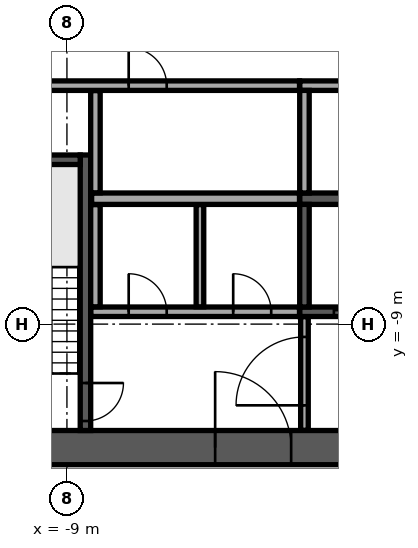
"""IFC4 building model, lengths in metres.
Left out: names, types, materials, properties, quantities, classifications, styles, units other than length and angle.
Written with IfcOpenShell. Run it as: python <this file> out.ifc"""

import sys

from ifc_helpers import new_model, si_unit, direction, frame, frame_2d, origin, place, context, subcontext, project, spatial, rectangle, extrude, element, fill, save


model = new_model("IFC4")
c1 = context("Model", 3, precision=1e-05, world=origin(), true_north=direction((0.0, 1.0)))
c2 = subcontext(c1, "Body", "Model", "MODEL_VIEW")
j1 = project(units=[si_unit("LENGTHUNIT", "METRE"), si_unit("PLANEANGLEUNIT", "RADIAN")], contexts=[c1])
p1 = place(None, origin())
s1 = spatial("IfcSite", under=j1, at=p1, CompositionType="ELEMENT")
p2 = place(p1, origin())
s2 = spatial("IfcBuilding", under=s1, at=p2, CompositionType="ELEMENT")
p3 = place(p2, frame((0.0, 0.0, 205.3)))
s3 = spatial("IfcBuildingStorey", under=s2, at=p3, CompositionType="ELEMENT", Elevation=205.3)
p4 = place(p3, frame((-12.7, -12.25, 0.0), z_axis=(0.0, 0.0, 1.0), x_axis=(1.0, 0.0, 0.0)))
e1 = element("IfcWall", 1, at=p4, inside=s3, PredefinedType="SHEAR", context=c2, shape_type="SweptSolid", body=[
    extrude(rectangle(XDim=25.4, YDim=0.9, at=frame_2d((12.7, 0.0))), origin(), (0.0, 0.0, 1.0), 3.62),
])
p5 = place(p4, frame((7.6, 0.0, 0.0)))
e2 = element("IfcOpeningElement", 2, at=p5, cuts=e1, PredefinedType="OPENING", context=c2, shape_type="SweptSolid", body=[
    extrude(rectangle(XDim=2.0, YDim=2.1, at=frame_2d((1.0, 1.05))), frame((0.0, 0.46, 0.0), z_axis=(0.0, -1.0, 0.0), x_axis=(1.0, 0.0, 0.0)), (0.0, 0.0, 1.0), 0.92),
])
p6 = place(p4, frame((17.725, 0.0, 0.0)))
e3 = element("IfcOpeningElement", 3, at=p6, cuts=e1, PredefinedType="OPENING", context=c2, shape_type="SweptSolid", body=[
    extrude(rectangle(XDim=1.2, YDim=2.1, at=frame_2d((0.6, 1.05))), frame((0.0, 0.46, 0.0), z_axis=(0.0, -1.0, 0.0), x_axis=(1.0, 0.0, 0.0)), (0.0, 0.0, 1.0), 0.92),
])
p7 = place(p4, frame((1.875, 0.0, 0.0)))
e4 = element("IfcOpeningElement", 4, at=p7, cuts=e1, PredefinedType="OPENING", context=c2, shape_type="SweptSolid", body=[
    extrude(rectangle(XDim=1.2, YDim=2.1, at=frame_2d((0.6, 1.05))), frame((0.0, 0.46, 0.0), z_axis=(0.0, -1.0, 0.0), x_axis=(1.0, 0.0, 0.0)), (0.0, 0.0, 1.0), 0.92),
])
p8 = place(p4, frame((22.325, 0.0, 0.0)))
e5 = element("IfcOpeningElement", 5, at=p8, cuts=e1, PredefinedType="OPENING", context=c2, shape_type="SweptSolid", body=[
    extrude(rectangle(XDim=1.2, YDim=2.1, at=frame_2d((0.6, 1.05))), frame((0.0, 0.46, 0.0), z_axis=(0.0, -1.0, 0.0), x_axis=(1.0, 0.0, 0.0)), (0.0, 0.0, 1.0), 0.92),
])
p9 = place(p3, frame((-2.875, -5.7, 0.0), z_axis=(0.0, 0.0, 1.0), x_axis=(1.0, 0.0, 0.0)))
e6 = element("IfcWall", 6, at=p9, inside=s3, PredefinedType="SOLIDWALL", context=c2, shape_type="SweptSolid", body=[
    extrude(rectangle(XDim=11.25, YDim=0.3, at=frame_2d((5.625, 0.0))), origin(), (0.0, 0.0, 1.0), 3.62),
])
p10 = place(p3, frame((-2.875, -2.725, 0.0), z_axis=(0.0, 0.0, 1.0), x_axis=(1.0, 0.0, 0.0)))
e7 = element("IfcWall", 7, at=p10, inside=s3, PredefinedType="SOLIDWALL", context=c2, shape_type="SweptSolid", body=[
    extrude(rectangle(XDim=8.5, YDim=0.25, at=frame_2d((4.25, 0.0))), origin(), (0.0, 0.0, 1.0), 3.62),
])
p11 = place(p3, frame((-2.75, -5.55, 0.0), z_axis=(0.0, 0.0, 1.0), x_axis=(0.0, 1.0, 0.0)))
e8 = element("IfcWall", 8, at=p11, inside=s3, PredefinedType="SOLIDWALL", context=c2, shape_type="SweptSolid", body=[
    extrude(rectangle(XDim=2.7, YDim=0.25, at=frame_2d((1.35, 0.0))), origin(), (0.0, 0.0, 1.0), 3.62),
])
p12 = place(p3, frame((-2.875, -8.675, 0.0), z_axis=(0.0, 0.0, 1.0), x_axis=(1.0, 0.0, 0.0)))
e9 = element("IfcWall", 9, at=p12, inside=s3, PredefinedType="SOLIDWALL", context=c2, shape_type="SweptSolid", body=[
    extrude(rectangle(XDim=11.25, YDim=0.25, at=frame_2d((5.625, 0.0))), origin(), (0.0, 0.0, 1.0), 3.62),
])
p13 = place(p12, frame((0.9, 0.0, 0.0)))
e10 = element("IfcOpeningElement", 10, at=p13, cuts=e9, PredefinedType="OPENING", context=c2, shape_type="SweptSolid", body=[
    extrude(rectangle(XDim=1.2, YDim=2.1, at=frame_2d((0.6, 1.05))), frame((0.0, 0.135, 0.0), z_axis=(0.0, -1.0, 0.0), x_axis=(1.0, 0.0, 0.0)), (0.0, 0.0, 1.0), 0.27),
])
p14 = place(p12, frame((3.65, 0.0, 0.0)))
e11 = element("IfcOpeningElement", 11, at=p14, cuts=e9, PredefinedType="OPENING", context=c2, shape_type="SweptSolid", body=[
    extrude(rectangle(XDim=1.2, YDim=2.1, at=frame_2d((0.6, 1.05))), frame((0.0, 0.135, 0.0), z_axis=(0.0, -1.0, 0.0), x_axis=(1.0, 0.0, 0.0)), (0.0, 0.0, 1.0), 0.27),
])
p15 = place(p12, frame((6.4, 0.0, 0.0)))
e12 = element("IfcOpeningElement", 12, at=p15, cuts=e9, PredefinedType="OPENING", context=c2, shape_type="SweptSolid", body=[
    extrude(rectangle(XDim=1.2, YDim=2.1, at=frame_2d((0.6, 1.05))), frame((0.0, 0.135, 0.0), z_axis=(0.0, -1.0, 0.0), x_axis=(1.0, 0.0, 0.0)), (0.0, 0.0, 1.0), 0.27),
])
p16 = place(p12, frame((9.15, 0.0, 0.0)))
e13 = element("IfcOpeningElement", 13, at=p16, cuts=e9, PredefinedType="OPENING", context=c2, shape_type="SweptSolid", body=[
    extrude(rectangle(XDim=1.2, YDim=2.1, at=frame_2d((0.6, 1.05))), frame((0.0, 0.135, 0.0), z_axis=(0.0, -1.0, 0.0), x_axis=(1.0, 0.0, 0.0)), (0.0, 0.0, 1.0), 0.27),
])
p17 = place(p3, frame((-2.75, -8.55, 0.0), z_axis=(0.0, 0.0, 1.0), x_axis=(0.0, 1.0, 0.0)))
e14 = element("IfcWall", 14, at=p17, inside=s3, PredefinedType="SOLIDWALL", context=c2, shape_type="SweptSolid", body=[
    extrude(rectangle(XDim=2.7, YDim=0.25, at=frame_2d((1.35, 0.0))), origin(), (0.0, 0.0, 1.0), 3.62),
])
p18 = place(p3, frame((-8.512, -4.55, 0.0), z_axis=(0.0, 0.0, 1.0), x_axis=(0.0, -1.0, 0.0)))
e15 = element("IfcWall", 15, at=p18, inside=s3, PredefinedType="SOLIDWALL", context=c2, shape_type="SweptSolid", body=[
    extrude(rectangle(XDim=7.25, YDim=0.275, at=frame_2d((3.625, 0.0))), origin(), (0.0, 0.0, 1.0), 3.62),
])
p19 = place(p18, frame((6.0, 0.0, 0.0)))
e16 = element("IfcOpeningElement", 16, at=p19, cuts=e15, PredefinedType="OPENING", context=c2, shape_type="SweptSolid", body=[
    extrude(rectangle(XDim=1.0, YDim=2.1, at=frame_2d((0.5, 1.05))), frame((0.0, 0.147, 0.0), z_axis=(0.0, -1.0, 0.0), x_axis=(1.0, 0.0, 0.0)), (0.0, 0.0, 1.0), 0.295),
])
p20 = place(p3, frame((-8.65, -4.675, 0.0), z_axis=(0.0, 0.0, 1.0), x_axis=(-1.0, 0.0, 0.0)))
e17 = element("IfcWall", 17, at=p20, inside=s3, PredefinedType="SOLIDWALL", context=c2, shape_type="SweptSolid", body=[
    extrude(rectangle(XDim=3.15, YDim=0.25, at=frame_2d((1.575, 0.0))), origin(), (0.0, 0.0, 1.0), 3.62),
])
p21 = place(p3, frame((-2.75, -11.795, 0.0), z_axis=(0.0, 0.0, 1.0), x_axis=(0.0, 1.0, 0.0)))
e18 = element("IfcWall", 18, at=p21, inside=s3, PredefinedType="PARTITIONING", context=c2, shape_type="SweptSolid", body=[
    extrude(rectangle(XDim=2.99, YDim=0.2, at=frame_2d((1.495, 0.0))), origin(), (0.0, 0.0, 1.0), 3.62),
])
p22 = place(p21, frame((0.657, 0.0, 0.0)))
e19 = element("IfcOpeningElement", 19, at=p22, cuts=e18, PredefinedType="OPENING", context=c2, shape_type="SweptSolid", body=[
    extrude(rectangle(XDim=1.8, YDim=2.1, at=frame_2d((0.9, 1.05))), frame((0.0, 0.11, 0.0), z_axis=(0.0, -1.0, 0.0), x_axis=(1.0, 0.0, 0.0)), (0.0, 0.0, 1.0), 0.22),
])
p23 = place(p3, frame((-8.37, -8.675, 0.0), z_axis=(0.0, 0.0, 1.0), x_axis=(1.0, 0.0, 0.0)))
e20 = element("IfcWall", 20, at=p23, inside=s3, PredefinedType="PARTITIONING", context=c2, shape_type="SweptSolid", body=[
    extrude(rectangle(XDim=5.49, YDim=0.25, at=frame_2d((2.745, 0.0))), origin(), (0.0, 0.0, 1.0), 3.62),
])
p24 = place(p23, frame((0.995, 0.0, 0.0)))
e21 = element("IfcOpeningElement", 21, at=p24, cuts=e20, PredefinedType="OPENING", context=c2, shape_type="SweptSolid", body=[
    extrude(rectangle(XDim=1.0, YDim=2.1, at=frame_2d((0.5, 1.05))), frame((0.0, 0.135, 0.0), z_axis=(0.0, -1.0, 0.0), x_axis=(1.0, 0.0, 0.0)), (0.0, 0.0, 1.0), 0.27),
])
p25 = place(p23, frame((3.745, 0.0, 0.0)))
e22 = element("IfcOpeningElement", 22, at=p25, cuts=e20, PredefinedType="OPENING", context=c2, shape_type="SweptSolid", body=[
    extrude(rectangle(XDim=1.0, YDim=2.1, at=frame_2d((0.5, 1.05))), frame((0.0, 0.135, 0.0), z_axis=(0.0, -1.0, 0.0), x_axis=(1.0, 0.0, 0.0)), (0.0, 0.0, 1.0), 0.27),
])
p26 = place(p3, frame((-8.25, -8.545, 0.0), z_axis=(0.0, 0.0, 1.0), x_axis=(0.0, 1.0, 0.0)))
e23 = element("IfcWall", 23, at=p26, inside=s3, PredefinedType="PARTITIONING", context=c2, shape_type="SweptSolid", body=[
    extrude(rectangle(XDim=2.69, YDim=0.25, at=frame_2d((1.345, 0.0))), origin(), (0.0, 0.0, 1.0), 3.62),
])
p27 = place(p3, frame((-5.5, -8.545, 0.0), z_axis=(0.0, 0.0, 1.0), x_axis=(0.0, 1.0, 0.0)))
e24 = element("IfcWall", 24, at=p27, inside=s3, PredefinedType="PARTITIONING", context=c2, shape_type="SweptSolid", body=[
    extrude(rectangle(XDim=2.69, YDim=0.2, at=frame_2d((1.345, 0.0))), origin(), (0.0, 0.0, 1.0), 3.62),
])
p28 = place(p3, frame((-8.35, -5.7, 0.0), z_axis=(0.0, 0.0, 1.0), x_axis=(1.0, 0.0, 0.0)))
e25 = element("IfcWall", 25, at=p28, inside=s3, PredefinedType="PARTITIONING", context=c2, shape_type="SweptSolid", body=[
    extrude(rectangle(XDim=5.47, YDim=0.3, at=frame_2d((2.735, 0.0))), origin(), (0.0, 0.0, 1.0), 3.62),
])
p29 = place(p3, frame((-8.25, -5.545, 0.0), z_axis=(0.0, 0.0, 1.0), x_axis=(0.0, 1.0, 0.0)))
e26 = element("IfcWall", 26, at=p29, inside=s3, PredefinedType="PARTITIONING", context=c2, shape_type="SweptSolid", body=[
    extrude(rectangle(XDim=2.69, YDim=0.25, at=frame_2d((1.345, 0.0))), origin(), (0.0, 0.0, 1.0), 3.62),
])
p30 = place(p3, frame((-11.795, -2.725, 0.0), z_axis=(0.0, 0.0, 1.0), x_axis=(1.0, 0.0, 0.0)))
e27 = element("IfcWall", 27, at=p30, inside=s3, PredefinedType="PARTITIONING", context=c2, shape_type="SweptSolid", body=[
    extrude(rectangle(XDim=8.915, YDim=0.25, at=frame_2d((4.458, 0.0))), origin(), (0.0, 0.0, 1.0), 3.62),
])
p31 = place(p30, frame((1.295, 0.0, 0.0)))
e28 = element("IfcOpeningElement", 28, at=p31, cuts=e27, PredefinedType="OPENING", context=c2, shape_type="SweptSolid", body=[
    extrude(rectangle(XDim=1.0, YDim=2.1, at=frame_2d((0.5, 1.05))), frame((0.0, 0.135, 0.0), z_axis=(0.0, -1.0, 0.0), x_axis=(1.0, 0.0, 0.0)), (0.0, 0.0, 1.0), 0.27),
])
p32 = place(p30, frame((4.42, 0.0, 0.0)))
e29 = element("IfcOpeningElement", 29, at=p32, cuts=e27, PredefinedType="OPENING", context=c2, shape_type="SweptSolid", body=[
    extrude(rectangle(XDim=1.0, YDim=2.1, at=frame_2d((0.5, 1.05))), frame((0.0, 0.135, 0.0), z_axis=(0.0, -1.0, 0.0), x_axis=(1.0, 0.0, 0.0)), (0.0, 0.0, 1.0), 0.27),
])
p33 = place(p3, frame((-34.658, -7.819, 0.0), z_axis=(0.0, 0.0, 1.0), x_axis=(0.719340729741, -0.694657408034, 0.0)))
e30 = element("IfcWall", 30, at=p33, inside=s3, PredefinedType="STANDARD", context=c2, shape_type="SweptSolid", body=[
    extrude(rectangle(XDim=39.0, YDim=0.6, at=frame_2d((19.5, 0.0))), origin(), (0.0, 0.0, 1.0), 3.62),
])
p34 = place(p33, frame((1.217, 0.0, 0.9)))
e31 = element("IfcOpeningElement", 31, at=p34, cuts=e30, PredefinedType="OPENING", context=c2, shape_type="SweptSolid", body=[
    extrude(rectangle(XDim=1.9, YDim=2.1, at=frame_2d((0.95, 1.05))), frame((0.0, 0.31, 0.0), z_axis=(0.0, -1.0, 0.0), x_axis=(1.0, 0.0, 0.0)), (0.0, 0.0, 1.0), 0.62),
])
p35 = place(p33, frame((5.55, 0.0, 0.9)))
e32 = element("IfcOpeningElement", 32, at=p35, cuts=e30, PredefinedType="OPENING", context=c2, shape_type="SweptSolid", body=[
    extrude(rectangle(XDim=1.9, YDim=2.1, at=frame_2d((0.95, 1.05))), frame((0.0, 0.31, 0.0), z_axis=(0.0, -1.0, 0.0), x_axis=(1.0, 0.0, 0.0)), (0.0, 0.0, 1.0), 0.62),
])
p36 = place(p33, frame((9.883, 0.0, 0.9)))
e33 = element("IfcOpeningElement", 33, at=p36, cuts=e30, PredefinedType="OPENING", context=c2, shape_type="SweptSolid", body=[
    extrude(rectangle(XDim=1.9, YDim=2.1, at=frame_2d((0.95, 1.05))), frame((0.0, 0.31, 0.0), z_axis=(0.0, -1.0, 0.0), x_axis=(1.0, 0.0, 0.0)), (0.0, 0.0, 1.0), 0.62),
])
p37 = place(p33, frame((14.217, 0.0, 0.9)))
e34 = element("IfcOpeningElement", 34, at=p37, cuts=e30, PredefinedType="OPENING", context=c2, shape_type="SweptSolid", body=[
    extrude(rectangle(XDim=1.9, YDim=2.1, at=frame_2d((0.95, 1.05))), frame((0.0, 0.31, 0.0), z_axis=(0.0, -1.0, 0.0), x_axis=(1.0, 0.0, 0.0)), (0.0, 0.0, 1.0), 0.62),
])
p38 = place(p33, frame((18.55, 0.0, 0.9)))
e35 = element("IfcOpeningElement", 35, at=p38, cuts=e30, PredefinedType="OPENING", context=c2, shape_type="SweptSolid", body=[
    extrude(rectangle(XDim=1.9, YDim=2.1, at=frame_2d((0.95, 1.05))), frame((0.0, 0.31, 0.0), z_axis=(0.0, -1.0, 0.0), x_axis=(1.0, 0.0, 0.0)), (0.0, 0.0, 1.0), 0.62),
])
p39 = place(p33, frame((22.883, 0.0, 0.9)))
e36 = element("IfcOpeningElement", 36, at=p39, cuts=e30, PredefinedType="OPENING", context=c2, shape_type="SweptSolid", body=[
    extrude(rectangle(XDim=1.9, YDim=2.1, at=frame_2d((0.95, 1.05))), frame((0.0, 0.31, 0.0), z_axis=(0.0, -1.0, 0.0), x_axis=(1.0, 0.0, 0.0)), (0.0, 0.0, 1.0), 0.62),
])
p40 = place(p33, frame((27.217, 0.0, 0.9)))
e37 = element("IfcOpeningElement", 37, at=p40, cuts=e30, PredefinedType="OPENING", context=c2, shape_type="SweptSolid", body=[
    extrude(rectangle(XDim=1.9, YDim=2.1, at=frame_2d((0.95, 1.05))), frame((0.0, 0.31, 0.0), z_axis=(0.0, -1.0, 0.0), x_axis=(1.0, 0.0, 0.0)), (0.0, 0.0, 1.0), 0.62),
])
p41 = place(p33, frame((31.55, 0.0, 0.9)))
e38 = element("IfcOpeningElement", 38, at=p41, cuts=e30, PredefinedType="OPENING", context=c2, shape_type="SweptSolid", body=[
    extrude(rectangle(XDim=1.9, YDim=2.1, at=frame_2d((0.95, 1.05))), frame((0.0, 0.31, 0.0), z_axis=(0.0, -1.0, 0.0), x_axis=(1.0, 0.0, 0.0)), (0.0, 0.0, 1.0), 0.62),
])
p42 = place(p33, frame((35.883, 0.0, 0.9)))
e39 = element("IfcOpeningElement", 39, at=p42, cuts=e30, PredefinedType="OPENING", context=c2, shape_type="SweptSolid", body=[
    extrude(rectangle(XDim=1.9, YDim=2.1, at=frame_2d((0.95, 1.05))), frame((0.0, 0.31, 0.0), z_axis=(0.0, -1.0, 0.0), x_axis=(1.0, 0.0, 0.0)), (0.0, 0.0, 1.0), 0.62),
])
p43 = place(p3, frame((-25.151, -6.479, 0.0), z_axis=(0.0, 0.0, 1.0), x_axis=(0.719341269489, -0.694656849106, 0.0)))
e40 = element("IfcWall", 40, at=p43, inside=s3, PredefinedType="PARTITIONING", context=c2, shape_type="SweptSolid", body=[
    extrude(rectangle(XDim=27.258, YDim=0.15, at=frame_2d((13.629, 0.0))), origin(), (0.0, 0.0, 1.0), 3.17),
])
p44 = place(p43, frame((3.55, 0.0, 0.0)))
e41 = element("IfcOpeningElement", 41, at=p44, cuts=e40, PredefinedType="OPENING", context=c2, shape_type="SweptSolid", body=[
    extrude(rectangle(XDim=1.0, YDim=2.1, at=frame_2d((0.5, 1.05))), frame((0.0, 0.085, 0.0), z_axis=(0.0, -1.0, 0.0), x_axis=(1.0, 0.0, 0.0)), (0.0, 0.0, 1.0), 0.17),
])
p45 = place(p43, frame((10.832, 0.0, 0.0)))
e42 = element("IfcOpeningElement", 42, at=p45, cuts=e40, PredefinedType="OPENING", context=c2, shape_type="SweptSolid", body=[
    extrude(rectangle(XDim=1.0, YDim=2.1, at=frame_2d((0.5, 1.05))), frame((0.0, 0.085, 0.0), z_axis=(0.0, -1.0, 0.0), x_axis=(1.0, 0.0, 0.0)), (0.0, 0.0, 1.0), 0.17),
])
p46 = place(p43, frame((13.797, 0.0, 0.0)))
e43 = element("IfcOpeningElement", 43, at=p46, cuts=e40, PredefinedType="OPENING", context=c2, shape_type="SweptSolid", body=[
    extrude(rectangle(XDim=1.0, YDim=2.1, at=frame_2d((0.5, 1.05))), frame((0.0, 0.085, 0.0), z_axis=(0.0, -1.0, 0.0), x_axis=(1.0, 0.0, 0.0)), (0.0, 0.0, 1.0), 0.17),
])
p47 = place(p5, origin())
e44 = element("IfcDoor", 44, at=p47, inside=s3, OperationType="SINGLE_SWING_LEFT", PredefinedType="DOOR", context=c2, shape_type="SweptSolid", body=[
    extrude(rectangle(XDim=2.0, YDim=2.1, at=frame_2d((1.0, 1.05))), frame((0.0, 0.025, 0.0), z_axis=(0.0, -1.0, 0.0), x_axis=(1.0, 0.0, 0.0)), (0.0, 0.0, 1.0), 0.05),
])
fill(e2, e44)
p48 = place(p13, origin())
e45 = element("IfcDoor", 45, at=p48, inside=s3, OperationType="DOUBLE_DOOR_SLIDING", PredefinedType="DOOR", context=c2, shape_type="SweptSolid", body=[
    extrude(rectangle(XDim=1.2, YDim=2.1, at=frame_2d((0.6, 1.05))), frame((0.0, 0.025, 0.0), z_axis=(0.0, -1.0, 0.0), x_axis=(1.0, 0.0, 0.0)), (0.0, 0.0, 1.0), 0.05),
])
fill(e10, e45)
p49 = place(p19, origin())
e46 = element("IfcDoor", 46, at=p49, inside=s3, OperationType="SINGLE_SWING_LEFT", PredefinedType="DOOR", context=c2, shape_type="SweptSolid", body=[
    extrude(rectangle(XDim=1.0, YDim=2.1, at=frame_2d((0.5, 1.05))), frame((0.0, 0.025, 0.0), z_axis=(0.0, -1.0, 0.0), x_axis=(1.0, 0.0, 0.0)), (0.0, 0.0, 1.0), 0.05),
])
fill(e16, e46)
p50 = place(p24, origin())
e47 = element("IfcDoor", 47, at=p50, inside=s3, OperationType="SINGLE_SWING_LEFT", PredefinedType="DOOR", context=c2, shape_type="SweptSolid", body=[
    extrude(rectangle(XDim=1.0, YDim=2.1, at=frame_2d((0.5, 1.05))), frame((0.0, 0.025, 0.0), z_axis=(0.0, -1.0, 0.0), x_axis=(1.0, 0.0, 0.0)), (0.0, 0.0, 1.0), 0.05),
])
fill(e21, e47)
p51 = place(p25, origin())
e48 = element("IfcDoor", 48, at=p51, inside=s3, OperationType="SINGLE_SWING_LEFT", PredefinedType="DOOR", context=c2, shape_type="SweptSolid", body=[
    extrude(rectangle(XDim=1.0, YDim=2.1, at=frame_2d((0.5, 1.05))), frame((0.0, 0.025, 0.0), z_axis=(0.0, -1.0, 0.0), x_axis=(1.0, 0.0, 0.0)), (0.0, 0.0, 1.0), 0.05),
])
fill(e22, e48)
p52 = place(p32, origin())
e49 = element("IfcDoor", 49, at=p52, inside=s3, OperationType="SINGLE_SWING_LEFT", PredefinedType="DOOR", context=c2, shape_type="SweptSolid", body=[
    extrude(rectangle(XDim=1.0, YDim=2.1, at=frame_2d((0.5, 1.05))), frame((0.0, 0.025, 0.0), z_axis=(0.0, -1.0, 0.0), x_axis=(1.0, 0.0, 0.0)), (0.0, 0.0, 1.0), 0.05),
])
fill(e29, e49)
p53 = place(p22, origin())
e50 = element("IfcDoor", 50, at=p53, inside=s3, OperationType="SINGLE_SWING_LEFT", PredefinedType="DOOR", context=c2, shape_type="SweptSolid", body=[
    extrude(rectangle(XDim=1.8, YDim=2.1, at=frame_2d((0.9, 1.05))), frame((0.0, 0.025, 0.0), z_axis=(0.0, -1.0, 0.0), x_axis=(1.0, 0.0, 0.0)), (0.0, 0.0, 1.0), 0.05),
])
fill(e19, e50)
save(model, sys.argv[1])
